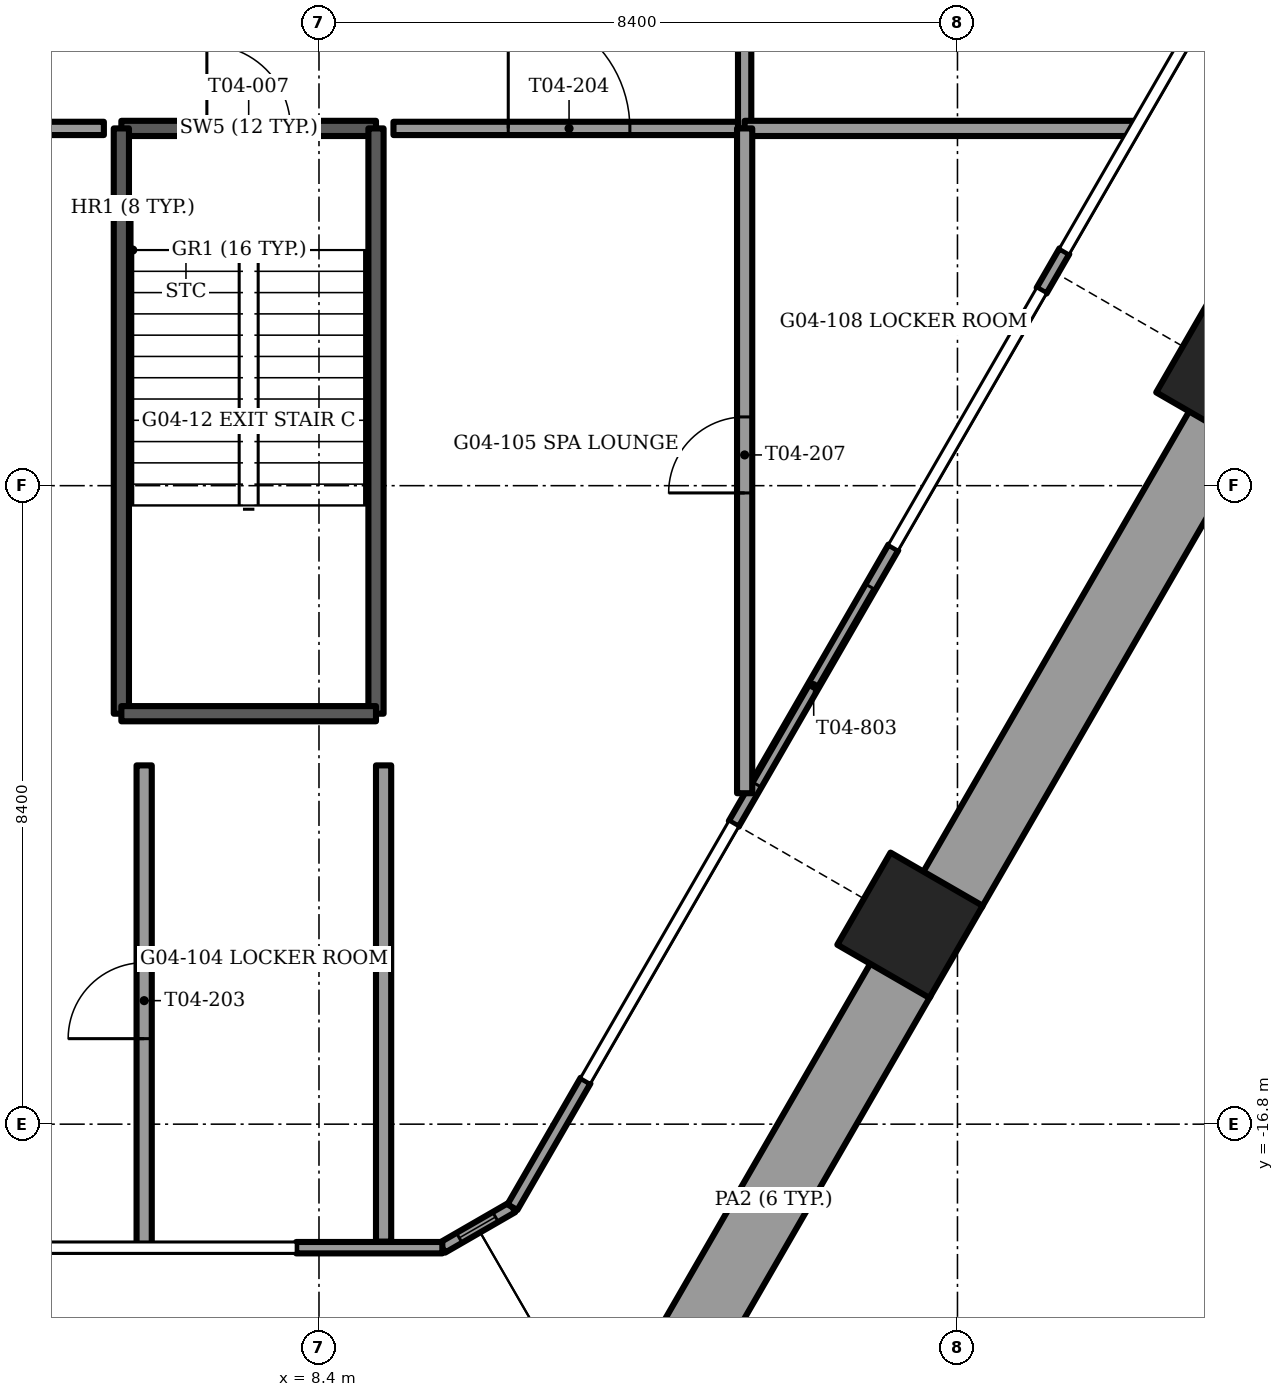
"""IFC4 building model, lengths in metres.
Left out: names, types, materials, properties, quantities, classifications, styles, units other than length and angle.
Written with IfcOpenShell. Run it as: python <this file> out.ifc"""

import sys

from ifc_helpers import new_model, si_unit, direction, frame, frame_2d, origin, origin_2d, place, context, subcontext, project, spatial, rectangle, extrude, element, fill, save


model = new_model("IFC4")
c1 = context("Model", 3, precision=1e-05, world=origin(), true_north=direction((0.0, 1.0)))
c2 = subcontext(c1, "Body", "Model", "MODEL_VIEW")
j1 = project(units=[si_unit("LENGTHUNIT", "METRE"), si_unit("PLANEANGLEUNIT", "RADIAN")], contexts=[c1])
p1 = place(None, origin())
s1 = spatial("IfcSite", under=j1, at=p1, CompositionType="ELEMENT")
p2 = place(p1, origin())
s2 = spatial("IfcBuilding", under=s1, at=p2, CompositionType="ELEMENT")
p3 = place(p2, frame((0.0, 0.0, 19.0)))
s3 = spatial("IfcBuildingStorey", under=s2, at=p3, CompositionType="ELEMENT", Elevation=19.0)
for number, where, z_axis, x_axis in (
    (1, (16.175, -14.183, -1.2), (0.0, 0.0, 1.0), (-0.5, -0.866, 0.0)),
    (2, (20.371, -6.917, -1.2), (0.0, 0.0, 1.0), (-0.5, -0.866, 0.0)),
):
    element("IfcColumn", number, at=place(p3, frame(where, z_axis=z_axis, x_axis=x_axis)), inside=s3, PredefinedType="COLUMN", context=c2, shape_type="SweptSolid", body=[
        extrude(rectangle(XDim=1.4, YDim=1.4, at=origin_2d()), origin(), (0.0, 0.0, 1.0), 4.5),
    ])
p4 = place(p3, frame((12.705, -20.694, 0.0), z_axis=(0.0, 0.0, 1.0), x_axis=(0.500005133765, 0.866022439784, 0.0)))
e3 = element("IfcWall", 3, at=p4, inside=s3, PredefinedType="PARAPET", context=c2, shape_type="SweptSolid", body=[
    extrude(rectangle(XDim=6.704, YDim=0.9, at=frame_2d((3.352, 0.0))), origin(), (0.0, 0.0, 1.0), 1.1),
])
p5 = place(p3, frame((16.727, -13.728, 0.0), z_axis=(0.0, 0.0, 1.0), x_axis=(0.499997206141, 0.866027016814, 0.0)))
e4 = element("IfcWall", 4, at=p5, inside=s3, PredefinedType="PARAPET", context=c2, shape_type="SweptSolid", body=[
    extrude(rectangle(XDim=7.051, YDim=0.9, at=frame_2d((3.525, 0.0))), origin(), (0.0, 0.0, 1.0), 1.1),
])
p6 = place(p3, frame((8.1, -18.425, 0.0), z_axis=(0.0, 0.0, 1.0), x_axis=(1.0, 0.0, 0.0)))
e5 = element("IfcWall", 5, at=p6, inside=s3, PredefinedType="SOLIDWALL", context=c2, shape_type="SweptSolid", body=[
    extrude(rectangle(XDim=1.923, YDim=0.15, at=frame_2d((0.961, 0.0))), origin(), (0.0, 0.0, 1.0), 4.2),
])
p7 = place(p3, frame((13.856, -12.85, 0.0), z_axis=(0.0, 0.0, 1.0), x_axis=(0.500002543286, 0.866023935413, 0.0)))
e6 = element("IfcWall", 6, at=p7, inside=s3, PredefinedType="SOLIDWALL", context=c2, shape_type="SweptSolid", body=[
    extrude(rectangle(XDim=4.2, YDim=0.15, at=frame_2d((2.1, 0.0))), origin(), (0.0, 0.0, 1.0), 4.2),
])
p8 = place(p7, frame((0.6, 0.0, 0.0)))
e7 = element("IfcOpeningElement", 7, at=p8, cuts=e6, PredefinedType="OPENING", context=c2, shape_type="SweptSolid", body=[
    extrude(rectangle(XDim=3.0, YDim=2.4, at=frame_2d((1.5, 1.2))), frame((0.0, 0.075, 0.0), z_axis=(0.0, -1.0, 0.0), x_axis=(1.0, 0.0, 0.0)), (0.0, 0.0, 1.0), 0.15),
])
p9 = place(p3, frame((10.945, -17.893, 0.0), z_axis=(0.0, 0.0, 1.0), x_axis=(0.499989888488, 0.86603124159, 0.0)))
e8 = element("IfcWall", 8, at=p9, inside=s3, PredefinedType="SOLIDWALL", context=c2, shape_type="SweptSolid", body=[
    extrude(rectangle(XDim=1.923, YDim=0.15, at=frame_2d((0.961, 0.0))), origin(), (0.0, 0.0, 1.0), 4.2),
])
p10 = place(p3, frame((17.906, -5.835, 0.0), z_axis=(0.0, 0.0, 1.0), x_axis=(0.50012165622, 0.865955154139, 0.0)))
e9 = element("IfcWall", 9, at=p10, inside=s3, PredefinedType="SOLIDWALL", context=c2, shape_type="SweptSolid", body=[
    extrude(rectangle(XDim=0.6, YDim=0.15, at=frame_2d((0.3, 0.0))), origin(), (0.0, 0.0, 1.0), 4.2),
])
p11 = place(p3, frame((10.023, -18.425, 0.0), z_axis=(0.0, 0.0, 1.0), x_axis=(0.866048165231, 0.499960573946, 0.0)))
e10 = element("IfcWall", 10, at=p11, inside=s3, PredefinedType="SOLIDWALL", context=c2, shape_type="SweptSolid", body=[
    extrude(rectangle(XDim=1.065, YDim=0.15, at=frame_2d((0.532, 0.0))), origin(), (0.0, 0.0, 1.0), 4.2),
])
p12 = place(p11, frame((0.258, 0.0, 0.15)))
e11 = element("IfcOpeningElement", 11, at=p12, cuts=e10, PredefinedType="OPENING", context=c2, shape_type="SweptSolid", body=[
    extrude(rectangle(XDim=0.55, YDim=3.6, at=frame_2d((0.275, 1.8))), frame((0.0, 0.075, 0.0), z_axis=(0.0, -1.0, 0.0), x_axis=(1.0, 0.0, 0.0)), (0.0, 0.0, 1.0), 0.15),
])
p13 = place(p3, frame((5.8, -3.7, -0.3), z_axis=(0.0, 0.0, 1.0), x_axis=(1.0, 0.0, 0.0)))
e12 = element("IfcWall", 12, at=p13, inside=s3, PredefinedType="SOLIDWALL", context=c2, shape_type="SweptSolid", body=[
    extrude(rectangle(XDim=3.35, YDim=0.2, at=frame_2d((1.675, 0.0))), origin(), (0.0, 0.0, 1.0), 4.5),
])
p14 = place(p13, frame((1.125, 0.0, 0.0)))
e13 = element("IfcOpeningElement", 13, at=p14, cuts=e12, PredefinedType="OPENING", context=c2, shape_type="SweptSolid", body=[
    extrude(rectangle(XDim=1.1, YDim=2.1, at=frame_2d((0.55, 1.05))), frame((0.0, 0.1, 0.0), z_axis=(0.0, -1.0, 0.0), x_axis=(1.0, 0.0, 0.0)), (0.0, 0.0, 1.0), 0.2),
])
for number, where, z_axis, x_axis in (
    (14, (5.8, -3.7, -0.3), (0.0, 0.0, 1.0), (0.0, -1.0, 0.0)),
    (15, (9.15, -3.7, -0.3), (0.0, 0.0, 1.0), (0.0, -1.0, 0.0)),
):
    element("IfcWall", number, at=place(p3, frame(where, z_axis=z_axis, x_axis=x_axis)), inside=s3, PredefinedType="SOLIDWALL", context=c2, shape_type="SweptSolid", body=[
        extrude(rectangle(XDim=7.7, YDim=0.2, at=frame_2d((3.85, 0.0))), origin(), (0.0, 0.0, 1.0), 4.5),
    ])
p15 = place(p3, frame((5.8, -11.4, -0.3), z_axis=(0.0, 0.0, 1.0), x_axis=(1.0, 0.0, 0.0)))
e16 = element("IfcWall", 16, at=p15, inside=s3, PredefinedType="SOLIDWALL", context=c2, shape_type="SweptSolid", body=[
    extrude(rectangle(XDim=3.35, YDim=0.2, at=frame_2d((1.675, 0.0))), origin(), (0.0, 0.0, 1.0), 4.5),
])
p16 = place(p3, frame((-5.57, -3.7, 0.0), z_axis=(0.0, 0.0, 1.0), x_axis=(1.0, 0.0, 0.0)))
e17 = element("IfcWall", 17, at=p16, inside=s3, PredefinedType="PARTITIONING", context=c2, shape_type="SweptSolid", body=[
    extrude(rectangle(XDim=11.14, YDim=0.175, at=frame_2d((5.57, 0.0))), origin(), (0.0, 0.0, 1.0), 4.2),
])
p17 = place(p16, frame((2.92, 0.0, 0.0)))
e18 = element("IfcOpeningElement", 18, at=p17, cuts=e17, PredefinedType="OPENING", context=c2, shape_type="SweptSolid", body=[
    extrude(rectangle(XDim=0.9, YDim=2.1, at=frame_2d((0.45, 1.05))), frame((0.0, 0.087, 0.0), z_axis=(0.0, -1.0, 0.0), x_axis=(1.0, 0.0, 0.0)), (0.0, 0.0, 1.0), 0.175),
])
p18 = place(p16, frame((7.755, 0.0, 0.0)))
e19 = element("IfcOpeningElement", 19, at=p18, cuts=e17, PredefinedType="OPENING", context=c2, shape_type="SweptSolid", body=[
    extrude(rectangle(XDim=1.6, YDim=2.1, at=frame_2d((0.8, 1.05))), frame((0.0, 0.087, 0.0), z_axis=(0.0, -1.0, 0.0), x_axis=(1.0, 0.0, 0.0)), (0.0, 0.0, 1.0), 0.175),
])
p19 = place(p3, frame((9.38, -3.7, 0.0), z_axis=(0.0, 0.0, 1.0), x_axis=(1.0, 0.0, 0.0)))
e20 = element("IfcWall", 20, at=p19, inside=s3, PredefinedType="PARTITIONING", context=c2, shape_type="SweptSolid", body=[
    extrude(rectangle(XDim=4.62, YDim=0.175, at=frame_2d((2.31, 0.0))), origin(), (0.0, 0.0, 1.0), 4.2),
])
p20 = place(p19, frame((1.51, 0.0, 0.0)))
e21 = element("IfcOpeningElement", 21, at=p20, cuts=e20, PredefinedType="OPENING", context=c2, shape_type="SweptSolid", body=[
    extrude(rectangle(XDim=1.6, YDim=2.1, at=frame_2d((0.8, 1.05))), frame((0.0, 0.087, 0.0), z_axis=(0.0, -1.0, 0.0), x_axis=(1.0, 0.0, 0.0)), (0.0, 0.0, 1.0), 0.175),
])
p21 = place(p3, frame((14.0, -3.7, 0.0), z_axis=(0.0, 0.0, 1.0), x_axis=(0.0, 1.0, 0.0)))
e22 = element("IfcWall", 22, at=p21, inside=s3, PredefinedType="PARTITIONING", context=c2, shape_type="SweptSolid", body=[
    extrude(rectangle(XDim=16.268, YDim=0.175, at=frame_2d((8.134, 0.0))), origin(), (0.0, 0.0, 1.0), 4.2),
])
p22 = place(p21, frame((4.85, 0.0, 0.0)))
e23 = element("IfcOpeningElement", 23, at=p22, cuts=e22, PredefinedType="OPENING", context=c2, shape_type="SweptSolid", body=[
    extrude(rectangle(XDim=0.9, YDim=2.1, at=frame_2d((0.45, 1.05))), frame((0.0, 0.087, 0.0), z_axis=(0.0, -1.0, 0.0), x_axis=(1.0, 0.0, 0.0)), (0.0, 0.0, 1.0), 0.175),
])
p23 = place(p21, frame((12.5, 0.0, 0.0)))
e24 = element("IfcOpeningElement", 24, at=p23, cuts=e22, PredefinedType="OPENING", context=c2, shape_type="SweptSolid", body=[
    extrude(rectangle(XDim=1.0, YDim=2.1, at=frame_2d((0.5, 1.05))), frame((0.0, 0.087, 0.0), z_axis=(0.0, -1.0, 0.0), x_axis=(1.0, 0.0, 0.0)), (0.0, 0.0, 1.0), 0.175),
])
p24 = place(p3, frame((14.0, -3.7, 0.0), z_axis=(0.0, 0.0, 1.0), x_axis=(1.0, 0.0, 0.0)))
e25 = element("IfcWall", 25, at=p24, inside=s3, PredefinedType="PARTITIONING", context=c2, shape_type="SweptSolid", body=[
    extrude(rectangle(XDim=5.118, YDim=0.2, at=frame_2d((2.559, 0.0))), origin(), (0.0, 0.0, 1.0), 4.2),
])
p25 = place(p3, frame((6.1, -18.406, 0.0), z_axis=(0.0, 0.0, 1.0), x_axis=(0.0, 1.0, 0.0)))
e26 = element("IfcWall", 26, at=p25, inside=s3, PredefinedType="PARTITIONING", context=c2, shape_type="SweptSolid", body=[
    extrude(rectangle(XDim=6.326, YDim=0.2, at=frame_2d((3.163, 0.0))), origin(), (0.0, 0.0, 1.0), 4.2),
])
p26 = place(p25, frame((2.731, 0.0, 0.0)))
e27 = element("IfcOpeningElement", 27, at=p26, cuts=e26, PredefinedType="OPENING", context=c2, shape_type="SweptSolid", body=[
    extrude(rectangle(XDim=1.0, YDim=2.1, at=frame_2d((0.5, 1.05))), frame((0.0, 0.1, 0.0), z_axis=(0.0, -1.0, 0.0), x_axis=(1.0, 0.0, 0.0)), (0.0, 0.0, 1.0), 0.2),
])
p27 = place(p3, frame((9.25, -18.345, 0.0), z_axis=(0.0, 0.0, 1.0), x_axis=(0.0, 1.0, 0.0)))
e28 = element("IfcWall", 28, at=p27, inside=s3, PredefinedType="PARTITIONING", context=c2, shape_type="SweptSolid", body=[
    extrude(rectangle(XDim=6.265, YDim=0.2, at=frame_2d((3.132, 0.0))), origin(), (0.0, 0.0, 1.0), 4.2),
])
p28 = place(p3, frame((14.0, -12.446, 0.0), z_axis=(0.0, 0.0, 1.0), x_axis=(0.0, 1.0, 0.0)))
e29 = element("IfcWall", 29, at=p28, inside=s3, PredefinedType="PARTITIONING", context=c2, shape_type="SweptSolid", body=[
    extrude(rectangle(XDim=8.746, YDim=0.2, at=frame_2d((4.373, 0.0))), origin(), (0.0, 0.0, 1.0), 4.2),
])
p29 = place(p28, frame((3.951, 0.0, 0.0)))
e30 = element("IfcOpeningElement", 30, at=p29, cuts=e29, PredefinedType="OPENING", context=c2, shape_type="SweptSolid", body=[
    extrude(rectangle(XDim=1.0, YDim=2.1, at=frame_2d((0.5, 1.05))), frame((0.0, 0.1, 0.0), z_axis=(0.0, -1.0, 0.0), x_axis=(1.0, 0.0, 0.0)), (0.0, 0.0, 1.0), 0.2),
])
p30 = place(p8, origin())
e31 = element("IfcDoor", 31, at=p30, inside=s3, OperationType="SLIDING_TO_RIGHT", PredefinedType="DOOR", context=c2, shape_type="SweptSolid", body=[
    extrude(rectangle(XDim=3.0, YDim=2.4, at=frame_2d((1.5, 1.2))), frame((0.0, 0.025, 0.0), z_axis=(0.0, -1.0, 0.0), x_axis=(1.0, 0.0, 0.0)), (0.0, 0.0, 1.0), 0.05),
])
fill(e7, e31)
p31 = place(p12, origin())
e32 = element("IfcWindow", 32, at=p31, inside=s3, PartitioningType="SINGLE_PANEL", PredefinedType="WINDOW", context=c2, shape_type="SweptSolid", body=[
    extrude(rectangle(XDim=0.55, YDim=3.6, at=frame_2d((0.275, 1.8))), frame((0.0, 0.03, 0.0), z_axis=(0.0, -1.0, 0.0), x_axis=(1.0, 0.0, 0.0)), (0.0, 0.0, 1.0), 0.06),
])
fill(e11, e32)
p32 = place(p14, origin())
e33 = element("IfcDoor", 33, at=p32, inside=s3, OperationType="SINGLE_SWING_LEFT", PredefinedType="DOOR", context=c2, shape_type="SweptSolid", body=[
    extrude(rectangle(XDim=1.1, YDim=2.1, at=frame_2d((0.55, 1.05))), frame((0.0, 0.025, 0.0), z_axis=(0.0, -1.0, 0.0), x_axis=(1.0, 0.0, 0.0)), (0.0, 0.0, 1.0), 0.05),
])
fill(e13, e33)
p33 = place(p26, origin())
e34 = element("IfcDoor", 34, at=p33, inside=s3, OperationType="SINGLE_SWING_LEFT", PredefinedType="DOOR", context=c2, shape_type="SweptSolid", body=[
    extrude(rectangle(XDim=1.0, YDim=2.1, at=frame_2d((0.5, 1.05))), frame((0.0, 0.025, 0.0), z_axis=(0.0, -1.0, 0.0), x_axis=(1.0, 0.0, 0.0)), (0.0, 0.0, 1.0), 0.05),
])
fill(e27, e34)
p34 = place(p20, origin())
e35 = element("IfcDoor", 35, at=p34, inside=s3, OperationType="DOUBLE_DOOR_SINGLE_SWING", PredefinedType="DOOR", context=c2, shape_type="SweptSolid", body=[
    extrude(rectangle(XDim=1.6, YDim=2.1, at=frame_2d((0.8, 1.05))), frame((0.0, 0.025, 0.0), z_axis=(0.0, -1.0, 0.0), x_axis=(1.0, 0.0, 0.0)), (0.0, 0.0, 1.0), 0.05),
])
fill(e21, e35)
p35 = place(p29, origin())
e36 = element("IfcDoor", 36, at=p35, inside=s3, OperationType="SINGLE_SWING_LEFT", PredefinedType="DOOR", context=c2, shape_type="SweptSolid", body=[
    extrude(rectangle(XDim=1.0, YDim=2.1, at=frame_2d((0.5, 1.05))), frame((0.0, 0.025, 0.0), z_axis=(0.0, -1.0, 0.0), x_axis=(1.0, 0.0, 0.0)), (0.0, 0.0, 1.0), 0.05),
])
fill(e30, e36)
save(model, sys.argv[1])
